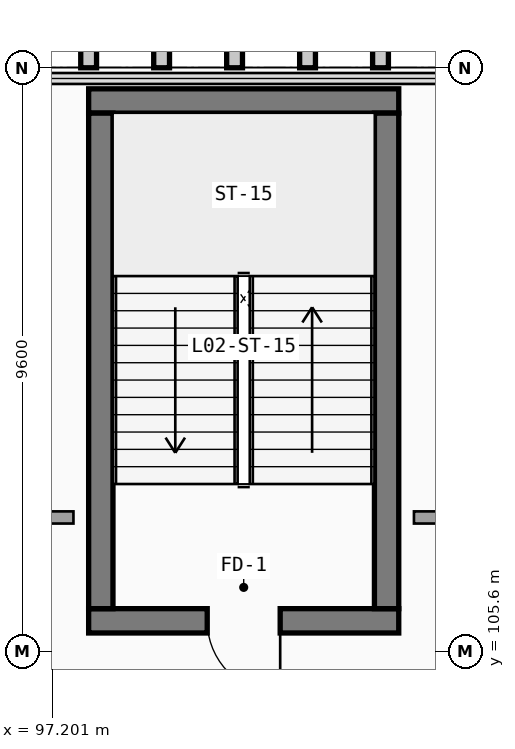
"""IFC4 building model, lengths in metres.
Left out: names, types, materials, properties, quantities, classifications, styles, units other than length and angle.
Written with IfcOpenShell. Run it as: python <this file> out.ifc"""

import sys

from ifc_helpers import new_model, si_unit, direction, frame, frame_2d, origin, place, context, subcontext, project, spatial, rectangle, extrude, element, fill, save


model = new_model("IFC4")
c1 = context("Model", 3, precision=1e-05, world=origin(), true_north=direction((0.0, 1.0)))
c2 = subcontext(c1, "Body", "Model", "MODEL_VIEW")
j1 = project(units=[si_unit("LENGTHUNIT", "METRE"), si_unit("PLANEANGLEUNIT", "RADIAN")], contexts=[c1])
p1 = place(None, origin())
s1 = spatial("IfcSite", under=j1, at=p1, CompositionType="ELEMENT")
p2 = place(p1, origin())
s2 = spatial("IfcBuilding", under=s1, at=p2, CompositionType="ELEMENT")
p3 = place(p2, frame((0.0, 0.0, 9.6)))
s3 = spatial("IfcBuildingStorey", under=s2, at=p3, CompositionType="ELEMENT", Elevation=9.6)
p4 = place(p3, frame((97.8, 106.1, 0.0), z_axis=(0.0, 0.0, 1.0), x_axis=(1.0, 0.0, 0.0)))
e1 = element("IfcWall", 1, at=p4, inside=s3, PredefinedType="SHEAR", context=c2, shape_type="SweptSolid", body=[
    extrude(rectangle(XDim=5.1, YDim=0.4, at=frame_2d((2.55, 0.0))), origin(), (0.0, 0.0, 1.0), 4.22),
])
p5 = place(p4, frame((3.15, 0.0, 0.0), z_axis=(0.0, 0.0, 1.0), x_axis=(-1.0, 0.0, 0.0)))
e2 = element("IfcOpeningElement", 2, at=p5, cuts=e1, PredefinedType="OPENING", context=c2, shape_type="SweptSolid", body=[
    extrude(rectangle(XDim=1.2, YDim=2.2, at=frame_2d((0.6, 1.1))), frame((0.0, 0.21, 0.0), z_axis=(0.0, -1.0, 0.0), x_axis=(1.0, 0.0, 0.0)), (0.0, 0.0, 1.0), 0.42),
])
p6 = place(p3, frame((102.9, 114.65, 0.0), z_axis=(0.0, 0.0, 1.0), x_axis=(-1.0, 0.0, 0.0)))
e3 = element("IfcWall", 3, at=p6, inside=s3, PredefinedType="SHEAR", context=c2, shape_type="SweptSolid", body=[
    extrude(rectangle(XDim=5.1, YDim=0.4, at=frame_2d((2.55, 0.0))), origin(), (0.0, 0.0, 1.0), 4.22),
])
for number, where, z_axis, x_axis in (
    (4, (98.0, 114.45, 0.0), (0.0, 0.0, 1.0), (0.0, -1.0, 0.0)),
    (5, (102.7, 106.3, 0.0), (0.0, 0.0, 1.0), (0.0, 1.0, 0.0)),
):
    element("IfcWall", number, at=place(p3, frame(where, z_axis=z_axis, x_axis=x_axis)), inside=s3, PredefinedType="SHEAR", context=c2, shape_type="SweptSolid", body=[
        extrude(rectangle(XDim=8.15, YDim=0.4, at=frame_2d((4.075, 0.0))), origin(), (0.0, 0.0, 1.0), 4.22),
    ])
p7 = place(p3, frame((92.38, 107.8, 0.0), z_axis=(0.0, 0.0, 1.0), x_axis=(1.0, 0.0, 0.0)))
e6 = element("IfcWall", 6, at=p7, inside=s3, PredefinedType="PARTITIONING", context=c2, shape_type="SweptSolid", body=[
    extrude(rectangle(XDim=5.17, YDim=0.2, at=frame_2d((2.585, 0.0))), origin(), (0.0, 0.0, 1.0), 3.613),
])
p8 = place(p7, frame((1.835, 0.0, 0.0), z_axis=(0.0, 0.0, 1.0), x_axis=(1.0, 0.0, 0.0)))
e7 = element("IfcOpeningElement", 7, at=p8, cuts=e6, PredefinedType="OPENING", context=c2, shape_type="SweptSolid", body=[
    extrude(rectangle(XDim=1.5, YDim=2.25, at=frame_2d((0.75, 1.125))), frame((0.0, 0.11, 0.0), z_axis=(0.0, -1.0, 0.0), x_axis=(1.0, 0.0, 0.0)), (0.0, 0.0, 1.0), 0.22),
])
p9 = place(p3, frame((103.15, 107.8, 0.0), z_axis=(0.0, 0.0, 1.0), x_axis=(1.0, 0.0, 0.0)))
e8 = element("IfcWall", 8, at=p9, inside=s3, PredefinedType="PARTITIONING", context=c2, shape_type="SweptSolid", body=[
    extrude(rectangle(XDim=3.67, YDim=0.2, at=frame_2d((1.835, 0.0))), origin(), (0.0, 0.0, 1.0), 3.613),
])
p10 = place(p5, origin())
e9 = element("IfcDoor", 9, at=p10, inside=s3, OperationType="SINGLE_SWING_LEFT", PredefinedType="DOOR", context=c2, shape_type="SweptSolid", body=[
    extrude(rectangle(XDim=1.2, YDim=2.2, at=frame_2d((0.6, 1.1))), frame((0.0, 0.025, 0.0), z_axis=(0.0, -1.0, 0.0), x_axis=(1.0, 0.0, 0.0)), (0.0, 0.0, 1.0), 0.05),
])
fill(e2, e9)
save(model, sys.argv[1])
